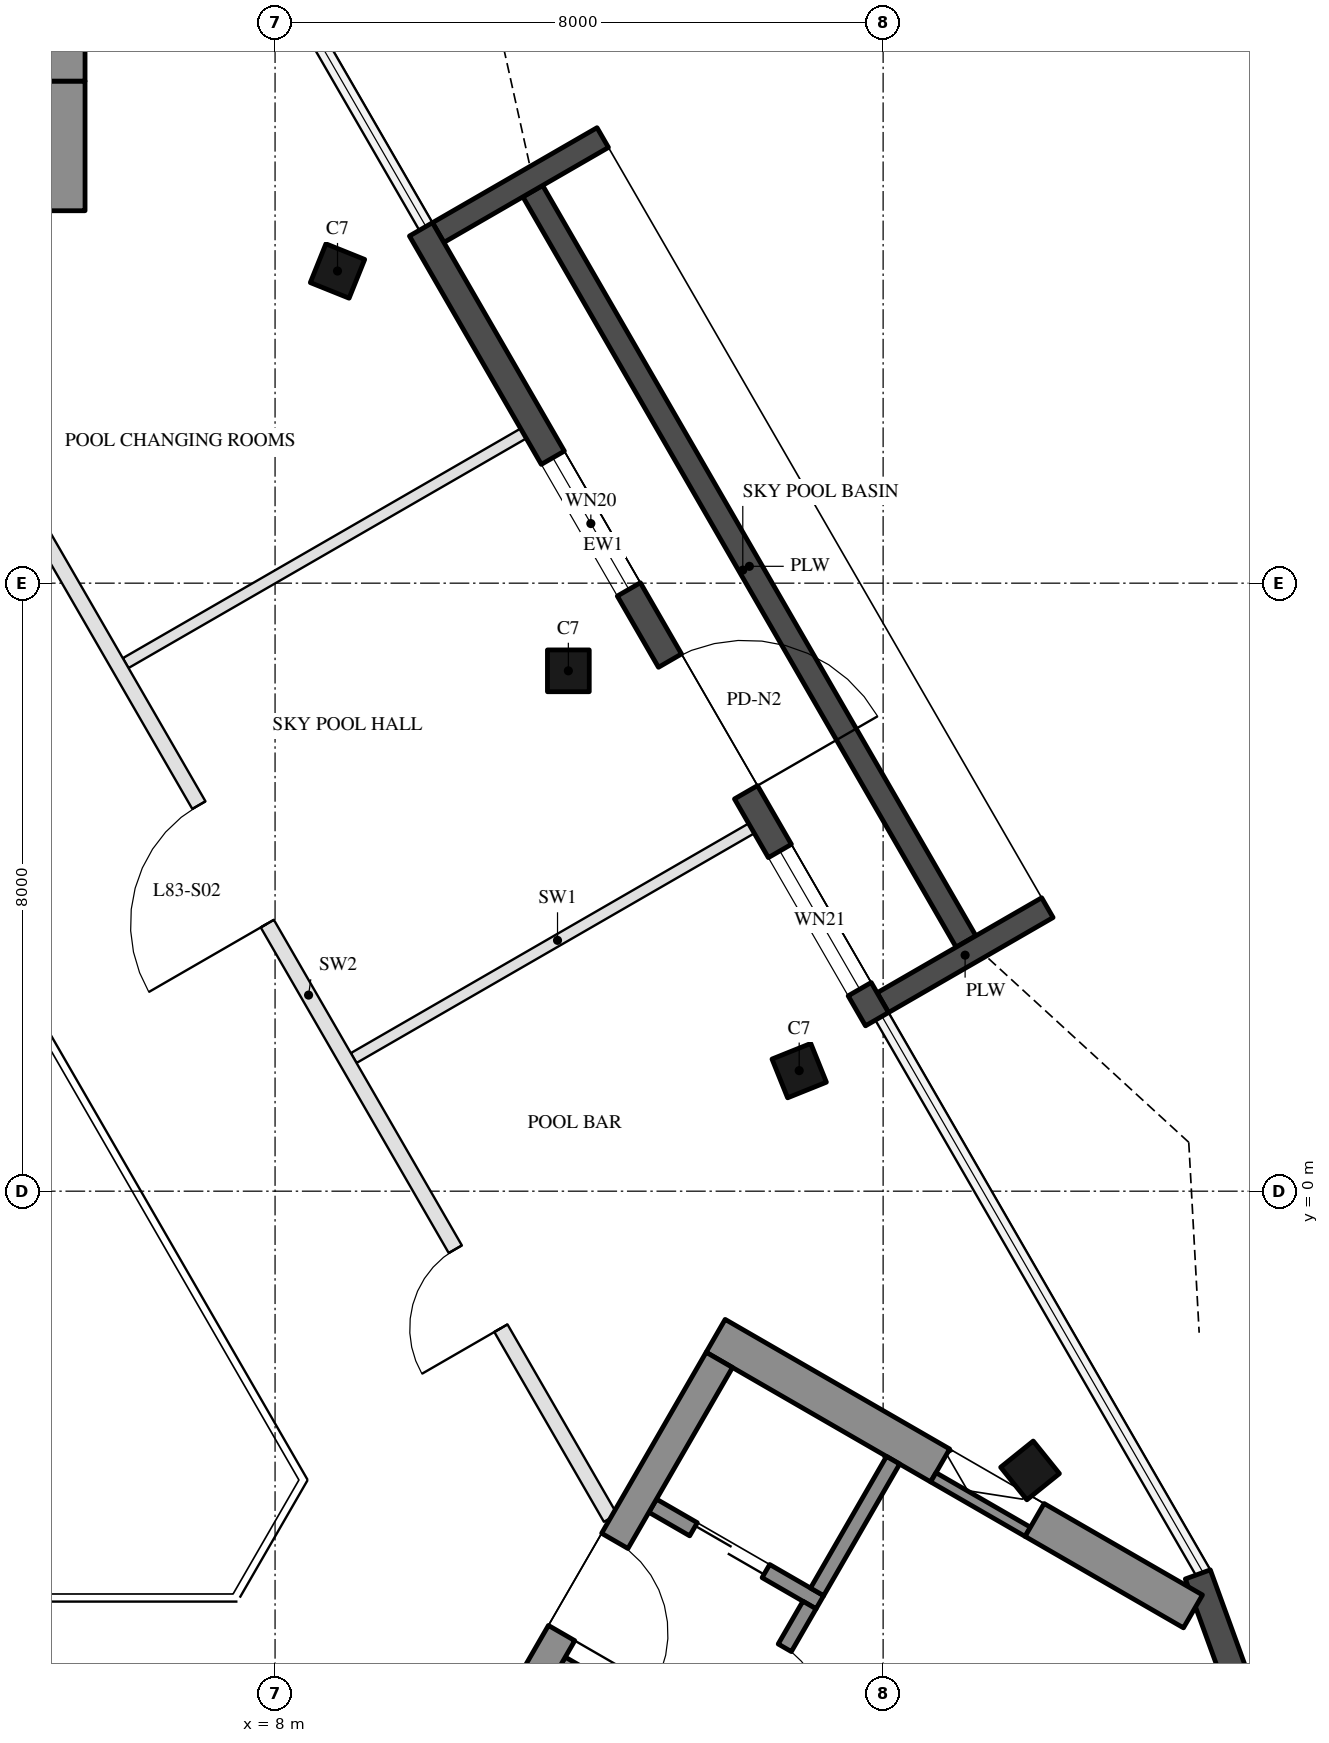
"""IFC4 building model, lengths in metres.
Left out: names, types, materials, properties, quantities, classifications, styles, units other than length and angle.
Written with IfcOpenShell. Run it as: python <this file> out.ifc"""

import sys

from ifc_helpers import new_model, si_unit, direction, frame, frame_2d, origin, origin_2d, place, context, subcontext, project, spatial, rectangle, hollow_rectangle, extrude, boolean, halfspace, element, fill, save


model = new_model("IFC4")
c1 = context("Model", 3, precision=1e-05, world=origin(), true_north=direction((0.0, 1.0)))
c2 = subcontext(c1, "Body", "Model", "MODEL_VIEW")
j1 = project(units=[si_unit("LENGTHUNIT", "METRE"), si_unit("PLANEANGLEUNIT", "RADIAN")], contexts=[c1])
p1 = place(None, origin())
s1 = spatial("IfcSite", under=j1, at=p1, CompositionType="ELEMENT")
p2 = place(p1, origin())
s2 = spatial("IfcBuilding", under=s1, at=p2, CompositionType="ELEMENT")
p3 = place(p2, frame((0.0, 0.0, 331.8)))
s3 = spatial("IfcBuildingStorey", under=s2, at=p3, CompositionType="ELEMENT", Elevation=331.8)
p4 = place(p3, frame((17.933, -3.674, 0.0), z_axis=(-0.110001598566, 0.017095599641, 0.993784377411), x_axis=(0.496031401637, -0.865495011969, 0.069794217853)))
e1 = element("IfcColumn", 1, at=p4, inside=s3, PredefinedType="COLUMN", context=c2, shape_type="SweptSolid", body=[
    boolean("DIFFERENCE", boolean("DIFFERENCE", extrude(hollow_rectangle(XDim=0.55, YDim=0.55, WallThickness=0.025, at=origin_2d()), origin(), (0.0, 0.0, 1.0), 6.541), halfspace(frame((0.0, 0.0, 0.018), z_axis=(0.0, 0.0, 1.0), x_axis=(1.0, 0.0, 0.0)), True)), halfspace(frame((0.0, 0.0, 6.517), z_axis=(0.0, 0.0, 1.0), x_axis=(1.0, 0.0, 0.0)), False)),
])
p5 = place(p3, frame((14.896, 1.586, 0.0), z_axis=(-0.092702425399, -0.013163071295, 0.995606847043), x_axis=(0.498429944547, -0.86622490994, 0.034957056199)))
e2 = element("IfcColumn", 2, at=p5, inside=s3, PredefinedType="COLUMN", context=c2, shape_type="SweptSolid", body=[
    boolean("DIFFERENCE", boolean("DIFFERENCE", extrude(hollow_rectangle(XDim=0.55, YDim=0.55, WallThickness=0.025, at=origin_2d()), origin(), (0.0, 0.0, 1.0), 6.529), halfspace(frame((0.0, 0.0, 0.016), z_axis=(0.0, 0.0, 1.0), x_axis=(1.0, 0.0, 0.0)), True)), halfspace(frame((0.0, 0.0, 6.509), z_axis=(0.0, 0.0, 1.0), x_axis=(1.0, 0.0, 0.0)), False)),
])
p6 = place(p3, frame((11.859, 6.847, 0.0), z_axis=(-0.075247573053, -0.043479701585, 0.99621650172), x_axis=(0.500351454226, -0.865822396472, 4.550396e-06)))
e3 = element("IfcColumn", 3, at=p6, inside=s3, PredefinedType="COLUMN", context=c2, shape_type="SweptSolid", body=[
    boolean("DIFFERENCE", boolean("DIFFERENCE", extrude(hollow_rectangle(XDim=0.55, YDim=0.55, WallThickness=0.025, at=origin_2d()), origin(), (0.0, 0.0, 1.0), 6.525), halfspace(frame((0.0, 0.0, 0.015), z_axis=(0.0, 0.0, 1.0), x_axis=(1.0, 0.0, 0.0)), True)), halfspace(frame((0.0, 0.0, 6.506), z_axis=(0.0, 0.0, 1.0), x_axis=(1.0, 0.0, 0.0)), False)),
])
p7 = place(p3, frame((8.822, 12.107, 0.0), z_axis=(-0.057738040202, -0.073705749506, 0.995607242442), x_axis=(-0.501061537175, 0.864705350939, 0.034957002453)))
e4 = element("IfcColumn", 4, at=p7, inside=s3, PredefinedType="COLUMN", context=c2, shape_type="SweptSolid", body=[
    boolean("DIFFERENCE", boolean("DIFFERENCE", extrude(hollow_rectangle(XDim=0.55, YDim=0.55, WallThickness=0.025, at=origin_2d()), origin(), (0.0, 0.0, 1.0), 6.529), halfspace(frame((0.0, 0.0, 0.016), z_axis=(0.0, 0.0, 1.0), x_axis=(1.0, 0.0, 0.0)), True)), halfspace(frame((0.0, 0.0, 6.509), z_axis=(0.0, 0.0, 1.0), x_axis=(1.0, 0.0, 0.0)), False)),
])
p8 = place(p3, frame((20.643, -6.422, 0.0), z_axis=(0.0, 0.0, 1.0), x_axis=(-0.341943264121, 0.939720598967, 0.0)))
e5 = element("IfcWall", 5, at=p8, inside=s3, PredefinedType="SOLIDWALL", context=c2, shape_type="SweptSolid", body=[
    extrude(rectangle(XDim=1.469, YDim=0.35, at=frame_2d((0.734, 0.0))), origin(), (0.0, 0.0, 1.0), 6.25),
])
p9 = place(p3, frame((17.09, 3.285, 0.0), z_axis=(0.0, 0.0, 1.0), x_axis=(-0.500001763848, 0.866024385424, 0.0)))
e6 = element("IfcWall", 6, at=p9, inside=s3, PredefinedType="SOLIDWALL", context=c2, shape_type="SweptSolid", body=[
    extrude(rectangle(XDim=11.4, YDim=0.3, at=frame_2d((5.7, 0.0))), origin(), (0.0, 0.0, 1.0), 1.5),
])
for number, where, z_axis, x_axis in (
    (7, (15.996, 2.48, 0.0), (0.0, 0.0, 1.0), (0.866, 0.5, 0.0)),
    (8, (10.146, 12.613, 0.0), (0.0, 0.0, 1.0), (0.866, 0.5, 0.0)),
):
    element("IfcWall", number, at=place(p3, frame(where, z_axis=z_axis, x_axis=x_axis)), inside=s3, PredefinedType="SOLIDWALL", context=c2, shape_type="SweptSolid", body=[
        extrude(rectangle(XDim=2.5, YDim=0.3, at=frame_2d((1.25, 0.0))), origin(), (0.0, 0.0, 1.0), 1.5),
    ])
p10 = place(p3, frame((15.92, 2.263, 0.0), z_axis=(0.0, 0.0, 1.0), x_axis=(-0.49999894854, 0.866026010844, 0.0)))
e9 = element("IfcWall", 9, at=p10, inside=s3, PredefinedType="SOLIDWALL", context=c2, shape_type="SweptSolid", body=[
    extrude(rectangle(XDim=12.0, YDim=0.35, at=frame_2d((6.0, 0.0))), origin(), (0.0, 0.0, 1.0), 6.25),
])
p11 = place(p10, frame((0.456, 0.0, 0.3)))
e10 = element("IfcOpeningElement", 10, at=p11, cuts=e9, PredefinedType="OPENING", context=c2, shape_type="SweptSolid", body=[
    extrude(rectangle(XDim=2.1, YDim=2.65, at=frame_2d((1.05, 1.325))), frame((0.0, 0.185, 0.0), z_axis=(0.0, -1.0, 0.0), x_axis=(1.0, 0.0, 0.0)), (0.0, 0.0, 1.0), 0.37),
])
p12 = place(p10, frame((3.448, 0.0, 0.0)))
e11 = element("IfcOpeningElement", 11, at=p12, cuts=e9, PredefinedType="OPENING", context=c2, shape_type="SweptSolid", body=[
    extrude(rectangle(XDim=2.0, YDim=2.4, at=frame_2d((1.0, 1.2))), frame((0.0, 0.185, 0.0), z_axis=(0.0, -1.0, 0.0), x_axis=(1.0, 0.0, 0.0)), (0.0, 0.0, 1.0), 0.37),
])
p13 = place(p10, frame((6.53, 0.0, 0.3)))
e12 = element("IfcOpeningElement", 12, at=p13, cuts=e9, PredefinedType="OPENING", context=c2, shape_type="SweptSolid", body=[
    extrude(rectangle(XDim=2.0, YDim=2.65, at=frame_2d((1.0, 1.325))), frame((0.0, 0.185, 0.0), z_axis=(0.0, -1.0, 0.0), x_axis=(1.0, 0.0, 0.0)), (0.0, 0.0, 1.0), 0.37),
])
p14 = place(p3, frame((5.25, 12.9, 0.0), z_axis=(0.0, 0.0, 1.0), x_axis=(0.0, 1.0, 0.0)))
e13 = element("IfcWall", 13, at=p14, inside=s3, PredefinedType="SHEAR", context=c2, shape_type="SweptSolid", body=[
    extrude(rectangle(XDim=1.706, YDim=0.5, at=frame_2d((0.853, 0.0))), origin(), (0.0, 0.0, 1.0), 6.25),
])
p15 = place(p3, frame((5.25, 14.606, 0.0), z_axis=(0.0, 0.0, 1.0), x_axis=(0.0, 1.0, 0.0)))
e14 = element("IfcWall", 14, at=p15, inside=s3, PredefinedType="SHEAR", context=c2, shape_type="SweptSolid", body=[
    extrude(rectangle(XDim=1.705, YDim=0.5, at=frame_2d((0.853, 0.0))), origin(), (0.0, 0.0, 1.0), 6.25),
])
p16 = place(p3, frame((13.797, -1.903, 0.0), z_axis=(0.0, 0.0, 1.0), x_axis=(0.866036589769, -0.499980624807, 0.0)))
e15 = element("IfcWall", 15, at=p16, inside=s3, PredefinedType="SHEAR", context=c2, shape_type="SweptSolid", body=[
    extrude(rectangle(XDim=3.411, YDim=0.5, at=frame_2d((1.706, 0.0))), origin(), (0.0, 0.0, 1.0), 6.25),
])
p17 = place(p3, frame((16.66, -3.765, 0.0), z_axis=(0.0, 0.0, 1.0), x_axis=(0.866077922096, -0.499909024581, 0.0)))
e16 = element("IfcWall", 16, at=p17, inside=s3, PredefinedType="SHEAR", context=c2, shape_type="SweptSolid", body=[
    extrude(rectangle(XDim=1.435, YDim=0.14, at=frame_2d((0.717, 0.0))), origin(), (0.0, 0.0, 1.0), 6.25),
])
p18 = place(p3, frame((17.993, -4.326, 0.0), z_axis=(0.0, 0.0, 1.0), x_axis=(0.866030114221, -0.499991841196, 0.0)))
e17 = element("IfcWall", 17, at=p18, inside=s3, PredefinedType="SHEAR", context=c2, shape_type="SweptSolid", body=[
    extrude(rectangle(XDim=2.406, YDim=0.5, at=frame_2d((1.203, 0.0))), origin(), (0.0, 0.0, 1.0), 6.25),
])
p19 = place(p3, frame((11.768, -6.217, 0.0), z_axis=(0.0, 0.0, 1.0), x_axis=(0.866050077142, -0.499957262057, 0.0)))
e18 = element("IfcWall", 18, at=p19, inside=s3, PredefinedType="SHEAR", context=c2, shape_type="SweptSolid", body=[
    extrude(rectangle(XDim=2.4, YDim=0.2, at=frame_2d((1.2, 0.0))), origin(), (0.0, 0.0, 1.0), 6.25),
])
p20 = place(p3, frame((12.968, -4.138, 0.0), z_axis=(0.0, 0.0, 1.0), x_axis=(0.866022320763, -0.500005339912, 0.0)))
e19 = element("IfcWall", 19, at=p20, inside=s3, PredefinedType="SHEAR", context=c2, shape_type="SweptSolid", body=[
    extrude(rectangle(XDim=2.54, YDim=0.2, at=frame_2d((1.27, 0.0))), origin(), (0.0, 0.0, 1.0), 6.25),
])
p21 = place(p20, frame((0.62, 0.0, 0.0)))
e20 = element("IfcOpeningElement", 20, at=p21, cuts=e19, PredefinedType="OPENING", context=c2, shape_type="SweptSolid", body=[
    extrude(rectangle(XDim=1.1, YDim=2.1, at=frame_2d((0.55, 1.05))), frame((0.0, 0.11, 0.0), z_axis=(0.0, -1.0, 0.0), x_axis=(1.0, 0.0, 0.0)), (0.0, 0.0, 1.0), 0.22),
])
p22 = place(p3, frame((13.931, -7.35, 0.0), z_axis=(0.0, 0.0, 1.0), x_axis=(0.50002983664, 0.866008176907, 0.0)))
e21 = element("IfcWall", 21, at=p22, inside=s3, PredefinedType="SHEAR", context=c2, shape_type="SweptSolid", body=[
    extrude(rectangle(XDim=2.2, YDim=0.2, at=frame_2d((1.1, 0.0))), origin(), (0.0, 0.0, 1.0), 6.25),
])
p23 = place(p22, frame((0.65, 0.0, 0.0)))
e22 = element("IfcOpeningElement", 22, at=p23, cuts=e21, PredefinedType="OPENING", context=c2, shape_type="SweptSolid", body=[
    extrude(rectangle(XDim=0.9, YDim=2.1, at=frame_2d((0.45, 1.05))), frame((0.0, 0.11, 0.0), z_axis=(0.0, -1.0, 0.0), x_axis=(1.0, 0.0, 0.0)), (0.0, 0.0, 1.0), 0.22),
])
p24 = place(p3, frame((15.131, -5.272, 0.0), z_axis=(0.0, 0.0, 1.0), x_axis=(0.499972520799, 0.866041268327, 0.0)))
e23 = element("IfcWall", 23, at=p24, inside=s3, PredefinedType="SHEAR", context=c2, shape_type="SweptSolid", body=[
    extrude(rectangle(XDim=2.0, YDim=0.2, at=frame_2d((1.0, 0.0))), origin(), (0.0, 0.0, 1.0), 6.25),
])
p25 = place(p3, frame((10.12, -8.672, 0.0), z_axis=(0.0, 0.0, 1.0), x_axis=(0.500008956979, 0.866020232408, 0.0)))
e24 = element("IfcWall", 24, at=p25, inside=s3, PredefinedType="SHEAR", context=c2, shape_type="SweptSolid", body=[
    extrude(rectangle(XDim=7.45, YDim=0.4, at=frame_2d((3.725, 0.0))), origin(), (0.0, 0.0, 1.0), 6.25),
])
p26 = place(p25, frame((1.0, 0.0, 0.0)))
e25 = element("IfcOpeningElement", 25, at=p26, cuts=e24, PredefinedType="OPENING", context=c2, shape_type="SweptSolid", body=[
    extrude(rectangle(XDim=1.1, YDim=2.1, at=frame_2d((0.55, 1.05))), frame((0.0, 0.21, 0.0), z_axis=(0.0, -1.0, 0.0), x_axis=(1.0, 0.0, 0.0)), (0.0, 0.0, 1.0), 0.42),
])
p27 = place(p25, frame((3.3, 0.0, 0.0)))
e26 = element("IfcOpeningElement", 26, at=p27, cuts=e24, PredefinedType="OPENING", context=c2, shape_type="SweptSolid", body=[
    extrude(rectangle(XDim=1.4, YDim=2.1, at=frame_2d((0.7, 1.05))), frame((0.0, 0.21, 0.0), z_axis=(0.0, -1.0, 0.0), x_axis=(1.0, 0.0, 0.0)), (0.0, 0.0, 1.0), 0.42),
])
for number, where, z_axis, x_axis in (
    (27, (14.398, 4.849, 0.0), (0.0, 0.0, 1.0), (-0.866, -0.5, 0.0)),
    (28, (11.398, 10.045, 0.0), (0.0, 0.0, 1.0), (-0.866, -0.5, 0.0)),
):
    element("IfcWall", number, at=place(p3, frame(where, z_axis=z_axis, x_axis=x_axis)), inside=s3, PredefinedType="PARTITIONING", context=c2, shape_type="SweptSolid", body=[
        extrude(rectangle(XDim=6.193, YDim=0.15, at=frame_2d((3.097, 0.0))), origin(), (0.0, 0.0, 1.0), 5.85),
    ])
p28 = place(p3, frame((12.413, -4.3, 0.0), z_axis=(0.0, 0.0, 1.0), x_axis=(-0.50000478328, 0.866022642139, 0.0)))
e29 = element("IfcWall", 29, at=p28, inside=s3, PredefinedType="PARTITIONING", context=c2, shape_type="SweptSolid", body=[
    extrude(rectangle(XDim=19.861, YDim=0.2, at=frame_2d((9.931, 0.0))), origin(), (0.0, 0.0, 1.0), 5.85),
])
p29 = place(p28, frame((2.884, 0.0, 0.0)))
e30 = element("IfcOpeningElement", 30, at=p29, cuts=e29, PredefinedType="OPENING", context=c2, shape_type="SweptSolid", body=[
    extrude(rectangle(XDim=1.2, YDim=2.1, at=frame_2d((0.6, 1.05))), frame((0.0, 0.11, 0.0), z_axis=(0.0, -1.0, 0.0), x_axis=(1.0, 0.0, 0.0)), (0.0, 0.0, 1.0), 0.22),
])
p30 = place(p28, frame((9.031, 0.0, 0.0)))
e31 = element("IfcOpeningElement", 31, at=p30, cuts=e29, PredefinedType="OPENING", context=c2, shape_type="SweptSolid", body=[
    extrude(rectangle(XDim=1.8, YDim=2.4, at=frame_2d((0.9, 1.2))), frame((0.0, 0.11, 0.0), z_axis=(0.0, -1.0, 0.0), x_axis=(1.0, 0.0, 0.0)), (0.0, 0.0, 1.0), 0.22),
])
p31 = place(p28, frame((15.877, 0.0, 0.0)))
e32 = element("IfcOpeningElement", 32, at=p31, cuts=e29, PredefinedType="OPENING", context=c2, shape_type="SweptSolid", body=[
    extrude(rectangle(XDim=1.0, YDim=2.1, at=frame_2d((0.5, 1.05))), frame((0.0, 0.11, 0.0), z_axis=(0.0, -1.0, 0.0), x_axis=(1.0, 0.0, 0.0)), (0.0, 0.0, 1.0), 0.22),
])
p32 = place(p11, origin())
e33 = element("IfcWindow", 33, at=p32, inside=s3, PartitioningType="SINGLE_PANEL", PredefinedType="WINDOW", context=c2, shape_type="SweptSolid", body=[
    extrude(rectangle(XDim=2.1, YDim=2.65, at=frame_2d((1.05, 1.325))), frame((0.0, 0.03, 0.0), z_axis=(0.0, -1.0, 0.0), x_axis=(1.0, 0.0, 0.0)), (0.0, 0.0, 1.0), 0.06),
])
fill(e10, e33)
p33 = place(p12, frame((2.0, 0.0, 0.0), z_axis=(0.0, 0.0, 1.0), x_axis=(-1.0, 0.0, 0.0)))
e34 = element("IfcDoor", 34, at=p33, inside=s3, OperationType="DOUBLE_DOOR_SINGLE_SWING", PredefinedType="DOOR", context=c2, shape_type="SweptSolid", body=[
    extrude(rectangle(XDim=2.0, YDim=2.4, at=frame_2d((1.0, 1.2))), frame((0.0, 0.025, 0.0), z_axis=(0.0, -1.0, 0.0), x_axis=(1.0, 0.0, 0.0)), (0.0, 0.0, 1.0), 0.05),
])
fill(e11, e34)
p34 = place(p13, origin())
e35 = element("IfcWindow", 35, at=p34, inside=s3, PartitioningType="SINGLE_PANEL", PredefinedType="WINDOW", context=c2, shape_type="SweptSolid", body=[
    extrude(rectangle(XDim=2.0, YDim=2.65, at=frame_2d((1.0, 1.325))), frame((0.0, 0.03, 0.0), z_axis=(0.0, -1.0, 0.0), x_axis=(1.0, 0.0, 0.0)), (0.0, 0.0, 1.0), 0.06),
])
fill(e12, e35)
p35 = place(p21, origin())
e36 = element("IfcDoor", 36, at=p35, inside=s3, OperationType="DOUBLE_DOOR_SLIDING", PredefinedType="DOOR", context=c2, shape_type="SweptSolid", body=[
    extrude(rectangle(XDim=1.1, YDim=2.1, at=frame_2d((0.55, 1.05))), frame((0.0, 0.025, 0.0), z_axis=(0.0, -1.0, 0.0), x_axis=(1.0, 0.0, 0.0)), (0.0, 0.0, 1.0), 0.05),
])
fill(e20, e36)
p36 = place(p23, frame((0.9, 0.0, 0.0), z_axis=(0.0, 0.0, 1.0), x_axis=(-1.0, 0.0, 0.0)))
e37 = element("IfcDoor", 37, at=p36, inside=s3, OperationType="SINGLE_SWING_RIGHT", PredefinedType="DOOR", context=c2, shape_type="SweptSolid", body=[
    extrude(rectangle(XDim=0.9, YDim=2.1, at=frame_2d((0.45, 1.05))), frame((0.0, 0.025, 0.0), z_axis=(0.0, -1.0, 0.0), x_axis=(1.0, 0.0, 0.0)), (0.0, 0.0, 1.0), 0.05),
])
fill(e22, e37)
p37 = place(p27, frame((1.4, 0.0, 0.0), z_axis=(0.0, 0.0, 1.0), x_axis=(-1.0, 0.0, 0.0)))
e38 = element("IfcDoor", 38, at=p37, inside=s3, OperationType="DOUBLE_DOOR_SINGLE_SWING", PredefinedType="DOOR", context=c2, shape_type="SweptSolid", body=[
    extrude(rectangle(XDim=1.4, YDim=2.1, at=frame_2d((0.7, 1.05))), frame((0.0, 0.025, 0.0), z_axis=(0.0, -1.0, 0.0), x_axis=(1.0, 0.0, 0.0)), (0.0, 0.0, 1.0), 0.05),
])
fill(e26, e38)
p38 = place(p29, origin())
e39 = element("IfcDoor", 39, at=p38, inside=s3, OperationType="SINGLE_SWING_LEFT", PredefinedType="DOOR", context=c2, shape_type="SweptSolid", body=[
    extrude(rectangle(XDim=1.2, YDim=2.1, at=frame_2d((0.6, 1.05))), frame((0.0, 0.025, 0.0), z_axis=(0.0, -1.0, 0.0), x_axis=(1.0, 0.0, 0.0)), (0.0, 0.0, 1.0), 0.05),
])
fill(e30, e39)
p39 = place(p30, origin())
e40 = element("IfcDoor", 40, at=p39, inside=s3, OperationType="DOUBLE_DOOR_SINGLE_SWING", PredefinedType="DOOR", context=c2, shape_type="SweptSolid", body=[
    extrude(rectangle(XDim=1.8, YDim=2.4, at=frame_2d((0.9, 1.2))), frame((0.0, 0.025, 0.0), z_axis=(0.0, -1.0, 0.0), x_axis=(1.0, 0.0, 0.0)), (0.0, 0.0, 1.0), 0.05),
])
fill(e31, e40)
save(model, sys.argv[1])
